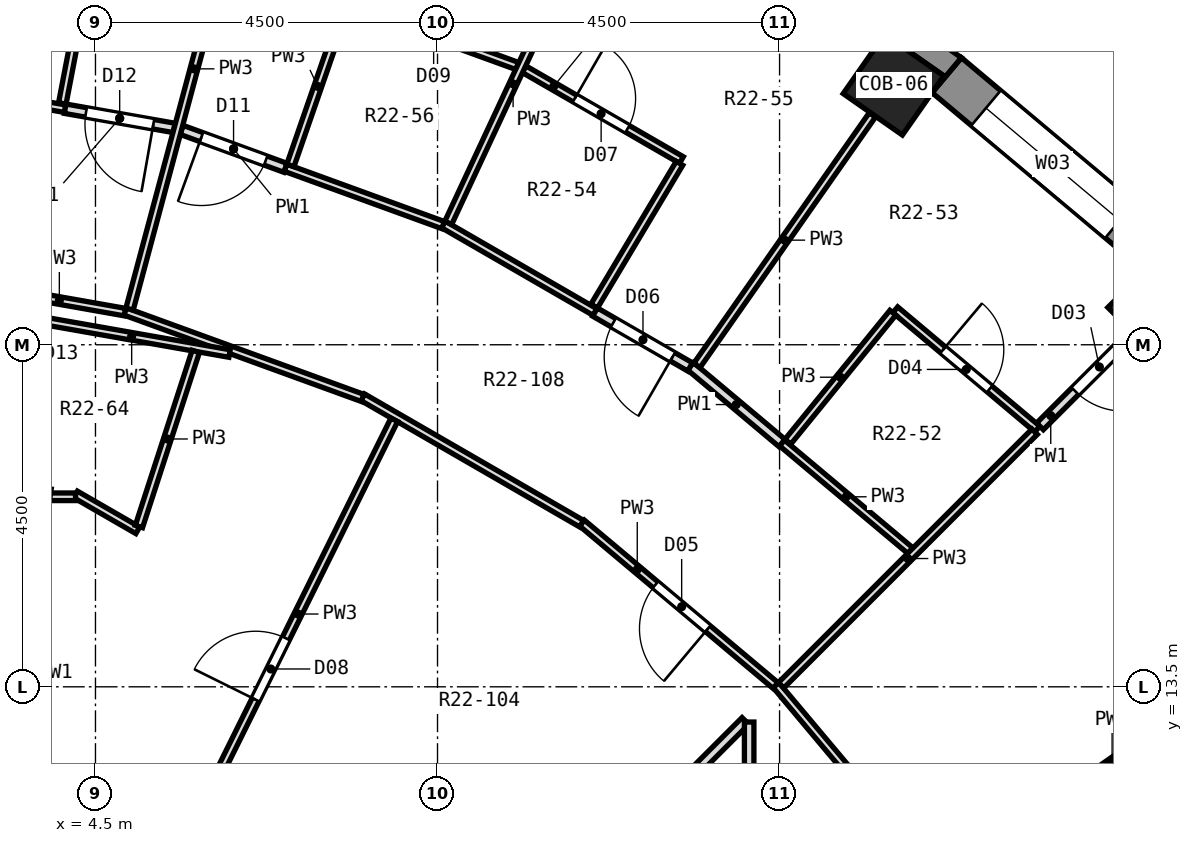
"""IFC4 building model, lengths in metres.
Left out: names, types, materials, properties, quantities, classifications, styles, units other than length and angle.
Written with IfcOpenShell. Run it as: python <this file> out.ifc"""

import sys

from ifc_helpers import new_model, si_unit, direction, frame, frame_2d, origin, origin_2d, place, context, subcontext, project, spatial, polyline, rectangle, outline, extrude, element, fill, save


model = new_model("IFC4")
c1 = context("Model", 3, precision=1e-05, world=origin(), true_north=direction((0.0, 1.0)))
c2 = subcontext(c1, "Body", "Model", "MODEL_VIEW")
j1 = project(units=[si_unit("LENGTHUNIT", "METRE"), si_unit("PLANEANGLEUNIT", "RADIAN")], contexts=[c1])
p1 = place(None, origin())
s1 = spatial("IfcSite", under=j1, at=p1, CompositionType="ELEMENT")
p2 = place(p1, origin())
s2 = spatial("IfcBuilding", under=s1, at=p2, CompositionType="ELEMENT")
p3 = place(p2, frame((0.0, 0.0, 141.4)))
s3 = spatial("IfcBuildingStorey", under=s2, at=p3, CompositionType="ELEMENT", Elevation=141.4)
for number, where, z_axis, x_axis in (
    (1, (18.491, 18.491, 0.0), (0.0, 0.0, 1.0), (0.707, 0.707, 0.0)),
    (2, (14.999, 21.421, 0.0), (0.0, 0.0, 1.0), (0.574, 0.819, 0.0)),
):
    element("IfcColumn", number, at=place(p3, frame(where, z_axis=z_axis, x_axis=x_axis)), inside=s3, PredefinedType="COLUMN", context=c2, shape_type="SweptSolid", body=[
        extrude(rectangle(XDim=0.95, YDim=0.95, at=origin_2d()), origin(), (0.0, 0.0, 1.0), 3.3),
    ])
p4 = place(p3, frame((18.494, 19.202, 0.0), z_axis=(0.0, 0.0, 1.0), x_axis=(-0.766055462616, 0.642774476932, 0.0)))
e3 = element("IfcWall", 3, at=p4, inside=s3, PredefinedType="SOLIDWALL", context=c2, shape_type="SweptSolid", body=[
    extrude(rectangle(XDim=3.648, YDim=0.6, at=frame_2d((1.824, 0.0))), origin(), (0.0, 0.0, 1.0), 2.8),
])
p5 = place(p4, frame((0.674, 0.0, 0.9)))
e4 = element("IfcOpeningElement", 4, at=p5, cuts=e3, PredefinedType="OPENING", context=c2, shape_type="SweptSolid", body=[
    extrude(rectangle(XDim=2.3, YDim=1.8, at=frame_2d((1.15, 0.9))), frame((0.0, 0.312, 0.0), z_axis=(0.0, -1.0, 0.0), x_axis=(1.0, 0.0, 0.0)), (0.0, 0.0, 1.0), 0.624),
])
p6 = place(p3, origin())
e5 = element("IfcWall", 5, at=p6, inside=s3, PredefinedType="SOLIDWALL", context=c2, shape_type="SweptSolid", body=[
    extrude(outline(polyline([(15.028, 22.382), (14.728, 21.862), (14.882, 22.083), (15.661, 21.538), (15.506, 21.317), (15.892, 21.777), (15.028, 22.382)])), origin(), (0.0, 0.0, 1.0), 2.8),
])
p7 = place(p3, frame((13.452, 13.524, 0.0), z_axis=(0.0, 0.0, 1.0), x_axis=(0.642888943472, -0.765959402554, 0.0)))
e6 = element("IfcWall", 6, at=p7, inside=s3, PredefinedType="PARTITIONING", context=c2, shape_type="SweptSolid", body=[
    extrude(rectangle(XDim=3.325, YDim=0.1, at=frame_2d((1.662, 0.0))), origin(), (0.0, 0.0, 1.0), 2.8),
])
p8 = place(p3, frame((10.9, 15.655, 0.0), z_axis=(0.0, 0.0, 1.0), x_axis=(0.765959402554, -0.642888943472, 0.0)))
e7 = element("IfcWall", 7, at=p8, inside=s3, PredefinedType="PARTITIONING", context=c2, shape_type="SweptSolid", body=[
    extrude(rectangle(XDim=3.325, YDim=0.1, at=frame_2d((1.662, 0.0))), origin(), (0.0, 0.0, 1.0), 2.8),
])
p9 = place(p8, frame((1.263, 0.0, 0.0)))
e8 = element("IfcOpeningElement", 8, at=p9, cuts=e7, PredefinedType="OPENING", context=c2, shape_type="SweptSolid", body=[
    extrude(rectangle(XDim=0.9, YDim=2.1, at=frame_2d((0.45, 1.05))), frame((0.0, 0.062, 0.0), z_axis=(0.0, -1.0, 0.0), x_axis=(1.0, 0.0, 0.0)), (0.0, 0.0, 1.0), 0.124),
])
p10 = place(p3, frame((13.532, 16.708, 0.0), z_axis=(0.0, 0.0, 1.0), x_axis=(0.766038513467, -0.642794676305, 0.0)))
e9 = element("IfcWall", 9, at=p10, inside=s3, PredefinedType="PARTITIONING", context=c2, shape_type="SweptSolid", body=[
    extrude(rectangle(XDim=2.205, YDim=0.1, at=frame_2d((1.103, 0.0))), origin(), (0.0, 0.0, 1.0), 2.8),
])
p11 = place(p3, frame((12.328, 17.718, 0.0), z_axis=(0.0, 0.0, 1.0), x_axis=(0.76611500949, -0.642703502585, 0.0)))
e10 = element("IfcWall", 10, at=p11, inside=s3, PredefinedType="PARTITIONING", context=c2, shape_type="SweptSolid", body=[
    extrude(rectangle(XDim=1.571, YDim=0.125, at=frame_2d((0.785, 0.0))), origin(), (0.0, 0.0, 1.0), 2.8),
])
p12 = place(p3, frame((15.022, 18.46, 0.0), z_axis=(0.0, 0.0, 1.0), x_axis=(0.765953139847, -0.642896404997, 0.0)))
e11 = element("IfcWall", 11, at=p12, inside=s3, PredefinedType="PARTITIONING", context=c2, shape_type="SweptSolid", body=[
    extrude(rectangle(XDim=2.44, YDim=0.1, at=frame_2d((1.22, 0.0))), origin(), (0.0, 0.0, 1.0), 2.8),
])
p13 = place(p12, frame((0.82, 0.0, 0.0)))
e12 = element("IfcOpeningElement", 12, at=p13, cuts=e11, PredefinedType="OPENING", context=c2, shape_type="SweptSolid", body=[
    extrude(rectangle(XDim=0.8, YDim=2.1, at=frame_2d((0.4, 1.05))), frame((0.0, 0.062, 0.0), z_axis=(0.0, -1.0, 0.0), x_axis=(1.0, 0.0, 0.0)), (0.0, 0.0, 1.0), 0.124),
])
p14 = place(p3, frame((4.238, 16.031, 0.0), z_axis=(0.0, 0.0, 1.0), x_axis=(0.866215708717, -0.499670237228, 0.0)))
e13 = element("IfcWall", 13, at=p14, inside=s3, PredefinedType="PARTITIONING", context=c2, shape_type="SweptSolid", body=[
    extrude(rectangle(XDim=0.945, YDim=0.1, at=frame_2d((0.472, 0.0))), origin(), (0.0, 0.0, 1.0), 2.8),
])
p15 = place(p3, frame((8.016, 17.309, 0.0), z_axis=(0.0, 0.0, 1.0), x_axis=(0.865920199123, -0.500182175564, 0.0)))
e14 = element("IfcWall", 14, at=p15, inside=s3, PredefinedType="PARTITIONING", context=c2, shape_type="SweptSolid", body=[
    extrude(rectangle(XDim=3.325, YDim=0.1, at=frame_2d((1.663, 0.0))), origin(), (0.0, 0.0, 1.0), 2.8),
])
p16 = place(p3, frame((9.076, 19.583, 0.0), z_axis=(0.0, 0.0, 1.0), x_axis=(0.865841628869, -0.500318172484, 0.0)))
e15 = element("IfcWall", 15, at=p16, inside=s3, PredefinedType="PARTITIONING", context=c2, shape_type="SweptSolid", body=[
    extrude(rectangle(XDim=2.306, YDim=0.1, at=frame_2d((1.153, 0.0))), origin(), (0.0, 0.0, 1.0), 2.8),
])
p17 = place(p3, frame((11.072, 18.43, 0.0), z_axis=(0.0, 0.0, 1.0), x_axis=(0.866112382925, -0.499849317439, 0.0)))
e16 = element("IfcWall", 16, at=p17, inside=s3, PredefinedType="PARTITIONING", context=c2, shape_type="SweptSolid", body=[
    extrude(rectangle(XDim=1.444, YDim=0.125, at=frame_2d((0.722, 0.0))), origin(), (0.0, 0.0, 1.0), 2.8),
])
p18 = place(p17, frame((0.278, 0.0, 0.0)))
e17 = element("IfcOpeningElement", 17, at=p18, cuts=e16, PredefinedType="OPENING", context=c2, shape_type="SweptSolid", body=[
    extrude(rectangle(XDim=0.9, YDim=2.1, at=frame_2d((0.45, 1.05))), frame((0.0, 0.074, 0.0), z_axis=(0.0, -1.0, 0.0), x_axis=(1.0, 0.0, 0.0)), (0.0, 0.0, 1.0), 0.149),
])
p19 = place(p3, frame((10.139, 21.625, 0.0), z_axis=(0.0, 0.0, 1.0), x_axis=(0.865989934965, -0.500061428766, 0.0)))
e18 = element("IfcWall", 18, at=p19, inside=s3, PredefinedType="PARTITIONING", context=c2, shape_type="SweptSolid", body=[
    extrude(rectangle(XDim=2.39, YDim=0.1, at=frame_2d((1.195, 0.0))), origin(), (0.0, 0.0, 1.0), 2.8),
])
p20 = place(p19, frame((0.77, 0.0, 0.0)))
e19 = element("IfcOpeningElement", 19, at=p20, cuts=e18, PredefinedType="OPENING", context=c2, shape_type="SweptSolid", body=[
    extrude(rectangle(XDim=0.8, YDim=2.1, at=frame_2d((0.4, 1.05))), frame((0.0, 0.062, 0.0), z_axis=(0.0, -1.0, 0.0), x_axis=(1.0, 0.0, 0.0)), (0.0, 0.0, 1.0), 0.124),
])
p21 = place(p3, frame((5.633, 20.827, 0.0), z_axis=(0.0, 0.0, 1.0), x_axis=(0.939292989356, -0.343116132159, 0.0)))
e20 = element("IfcWall", 20, at=p21, inside=s3, PredefinedType="PARTITIONING", context=c2, shape_type="SweptSolid", body=[
    extrude(rectangle(XDim=1.456, YDim=0.125, at=frame_2d((0.728, 0.0))), origin(), (0.0, 0.0, 1.0), 2.8),
])
p22 = place(p21, frame((0.278, 0.0, 0.0)))
e21 = element("IfcOpeningElement", 21, at=p22, cuts=e20, PredefinedType="OPENING", context=c2, shape_type="SweptSolid", body=[
    extrude(rectangle(XDim=0.9, YDim=2.1, at=frame_2d((0.45, 1.05))), frame((0.0, 0.074, 0.0), z_axis=(0.0, -1.0, 0.0), x_axis=(1.0, 0.0, 0.0)), (0.0, 0.0, 1.0), 0.149),
])
p23 = place(p3, frame((4.888, 18.438, 0.0), z_axis=(0.0, 0.0, 1.0), x_axis=(0.939679760884, -0.342055473549, 0.0)))
e22 = element("IfcWall", 22, at=p23, inside=s3, PredefinedType="PARTITIONING", context=c2, shape_type="SweptSolid", body=[
    extrude(rectangle(XDim=3.325, YDim=0.1, at=frame_2d((1.663, 0.0))), origin(), (0.0, 0.0, 1.0), 2.8),
])
p24 = place(p3, frame((7.001, 20.329, 0.0), z_axis=(0.0, 0.0, 1.0), x_axis=(0.939728749343, -0.341920864613, 0.0)))
e23 = element("IfcWall", 23, at=p24, inside=s3, PredefinedType="PARTITIONING", context=c2, shape_type="SweptSolid", body=[
    extrude(rectangle(XDim=2.205, YDim=0.1, at=frame_2d((1.103, 0.0))), origin(), (0.0, 0.0, 1.0), 2.8),
])
p25 = place(p3, frame((7.802, 22.485, 0.0), z_axis=(0.0, 0.0, 1.0), x_axis=(0.939659214987, -0.342111911063, 0.0)))
e24 = element("IfcWall", 24, at=p25, inside=s3, PredefinedType="PARTITIONING", context=c2, shape_type="SweptSolid", body=[
    extrude(rectangle(XDim=2.391, YDim=0.1, at=frame_2d((1.196, 0.0))), origin(), (0.0, 0.0, 1.0), 2.8),
])
p26 = place(p25, frame((0.821, 0.0, 0.0)))
e25 = element("IfcOpeningElement", 25, at=p26, cuts=e24, PredefinedType="OPENING", context=c2, shape_type="SweptSolid", body=[
    extrude(rectangle(XDim=0.8, YDim=2.1, at=frame_2d((0.4, 1.05))), frame((0.0, 0.062, 0.0), z_axis=(0.0, -1.0, 0.0), x_axis=(1.0, 0.0, 0.0)), (0.0, 0.0, 1.0), 0.124),
])
p27 = place(p3, frame((3.688, 18.338, 0.0), z_axis=(0.0, 0.0, 1.0), x_axis=(0.984859586639, -0.173353957572, 0.0)))
e26 = element("IfcWall", 26, at=p27, inside=s3, PredefinedType="PARTITIONING", context=c2, shape_type="SweptSolid", body=[
    extrude(rectangle(XDim=2.615, YDim=0.1, at=frame_2d((1.308, 0.0))), origin(), (0.0, 0.0, 1.0), 2.8),
])
p28 = place(p3, frame((1.612, 19.008, 0.0), z_axis=(0.0, 0.0, 1.0), x_axis=(0.984770991222, -0.173856535243, 0.0)))
e27 = element("IfcWall", 27, at=p28, inside=s3, PredefinedType="PARTITIONING", context=c2, shape_type="SweptSolid", body=[
    extrude(rectangle(XDim=3.325, YDim=0.1, at=frame_2d((1.663, 0.0))), origin(), (0.0, 0.0, 1.0), 2.8),
])
p29 = place(p28, frame((1.163, 0.0, 0.0)))
e28 = element("IfcOpeningElement", 28, at=p29, cuts=e27, PredefinedType="OPENING", context=c2, shape_type="SweptSolid", body=[
    extrude(rectangle(XDim=0.9, YDim=2.1, at=frame_2d((0.45, 1.05))), frame((0.0, 0.062, 0.0), z_axis=(0.0, -1.0, 0.0), x_axis=(1.0, 0.0, 0.0)), (0.0, 0.0, 1.0), 0.124),
])
p30 = place(p3, frame((1.831, 21.506, 0.0), z_axis=(0.0, 0.0, 1.0), x_axis=(0.984783558818, -0.173785333909, 0.0)))
e29 = element("IfcWall", 29, at=p30, inside=s3, PredefinedType="PARTITIONING", context=c2, shape_type="SweptSolid", body=[
    extrude(rectangle(XDim=2.305, YDim=0.1, at=frame_2d((1.153, 0.0))), origin(), (0.0, 0.0, 1.0), 2.8),
])
p31 = place(p3, frame((4.101, 21.105, 0.0), z_axis=(0.0, 0.0, 1.0), x_axis=(0.984862774054, -0.173335848233, 0.0)))
e30 = element("IfcWall", 30, at=p31, inside=s3, PredefinedType="PARTITIONING", context=c2, shape_type="SweptSolid", body=[
    extrude(rectangle(XDim=1.456, YDim=0.125, at=frame_2d((0.728, 0.0))), origin(), (0.0, 0.0, 1.0), 2.8),
])
p32 = place(p31, frame((0.278, 0.0, 0.0)))
e31 = element("IfcOpeningElement", 31, at=p32, cuts=e30, PredefinedType="OPENING", context=c2, shape_type="SweptSolid", body=[
    extrude(rectangle(XDim=0.9, YDim=2.1, at=frame_2d((0.45, 1.05))), frame((0.0, 0.074, 0.0), z_axis=(0.0, -1.0, 0.0), x_axis=(1.0, 0.0, 0.0)), (0.0, 0.0, 1.0), 0.149),
])
p33 = place(p3, frame((3.899, 16.0, 0.0), z_axis=(0.0, 0.0, 1.0), x_axis=(1.0, 0.0, 0.0)))
e32 = element("IfcWall", 32, at=p33, inside=s3, PredefinedType="PARTITIONING", context=c2, shape_type="SweptSolid", body=[
    extrude(rectangle(XDim=0.339, YDim=0.1, at=frame_2d((0.169, 0.0))), origin(), (0.0, 0.0, 1.0), 2.8),
])
p34 = place(p3, frame((15.663, 10.968, 0.0), z_axis=(0.0, 0.0, 1.0), x_axis=(0.8192371786, 0.573454832746, 0.0)))
e33 = element("IfcWall", 33, at=p34, inside=s3, PredefinedType="PARTITIONING", context=c2, shape_type="SweptSolid", body=[
    extrude(rectangle(XDim=6.544, YDim=0.1, at=frame_2d((3.272, 0.0))), origin(), (0.0, 0.0, 1.0), 2.8),
])
p35 = place(p34, frame((3.165, 0.0, 0.0)))
e34 = element("IfcOpeningElement", 34, at=p35, cuts=e33, PredefinedType="OPENING", context=c2, shape_type="SweptSolid", body=[
    extrude(rectangle(XDim=0.9, YDim=2.1, at=frame_2d((0.45, 1.05))), frame((0.0, 0.062, 0.0), z_axis=(0.0, -1.0, 0.0), x_axis=(1.0, 0.0, 0.0)), (0.0, 0.0, 1.0), 0.124),
])
p36 = place(p3, frame((13.52, 13.52, 0.0), z_axis=(0.0, 0.0, 1.0), x_axis=(0.707106781187, 0.707106781187, 0.0)))
e35 = element("IfcWall", 35, at=p36, inside=s3, PredefinedType="PARTITIONING", context=c2, shape_type="SweptSolid", body=[
    extrude(rectangle(XDim=4.717, YDim=0.1, at=frame_2d((2.358, 0.0))), origin(), (0.0, 0.0, 1.0), 2.8),
])
p37 = place(p3, frame((8.278, 8.278, 0.0), z_axis=(0.0, 0.0, 1.0), x_axis=(0.707106781187, 0.707106781187, 0.0)))
e36 = element("IfcWall", 36, at=p37, inside=s3, PredefinedType="PARTITIONING", context=c2, shape_type="SweptSolid", body=[
    extrude(rectangle(XDim=6.75, YDim=0.125, at=frame_2d((3.375, 0.0))), origin(), (0.0, 0.0, 1.0), 2.8),
])
p38 = place(p3, frame((16.926, 16.926, 0.0), z_axis=(0.0, 0.0, 1.0), x_axis=(0.707106781187, 0.707106781187, 0.0)))
e37 = element("IfcWall", 37, at=p38, inside=s3, PredefinedType="PARTITIONING", context=c2, shape_type="SweptSolid", body=[
    extrude(rectangle(XDim=1.728, YDim=0.125, at=frame_2d((0.864, 0.0))), origin(), (0.0, 0.0, 1.0), 2.8),
])
p39 = place(p38, frame((0.655, 0.0, 0.0)))
e38 = element("IfcOpeningElement", 38, at=p39, cuts=e37, PredefinedType="OPENING", context=c2, shape_type="SweptSolid", body=[
    extrude(rectangle(XDim=0.9, YDim=2.1, at=frame_2d((0.45, 1.05))), frame((0.0, 0.074, 0.0), z_axis=(0.0, -1.0, 0.0), x_axis=(1.0, 0.0, 0.0)), (0.0, 0.0, 1.0), 0.149),
])
p40 = place(p3, frame((13.609, 16.724, 0.0), z_axis=(0.0, 0.0, 1.0), x_axis=(0.631272959342, 0.77556073315, 0.0)))
e39 = element("IfcWall", 39, at=p40, inside=s3, PredefinedType="PARTITIONING", context=c2, shape_type="SweptSolid", body=[
    extrude(rectangle(XDim=2.188, YDim=0.1, at=frame_2d((1.094, 0.0))), origin(), (0.0, 0.0, 1.0), 2.8),
])
p41 = place(p3, frame((12.413, 17.728, 0.0), z_axis=(0.0, 0.0, 1.0), x_axis=(0.573641530368, 0.819106461113, 0.0)))
e40 = element("IfcWall", 40, at=p41, inside=s3, PredefinedType="PARTITIONING", context=c2, shape_type="SweptSolid", body=[
    extrude(rectangle(XDim=4.023, YDim=0.1, at=frame_2d((2.012, 0.0))), origin(), (0.0, 0.0, 1.0), 2.8),
])
p42 = place(p3, frame((11.061, 18.509, 0.0), z_axis=(0.0, 0.0, 1.0), x_axis=(0.512903306279, 0.85844638645, 0.0)))
e41 = element("IfcWall", 41, at=p42, inside=s3, PredefinedType="PARTITIONING", context=c2, shape_type="SweptSolid", body=[
    extrude(rectangle(XDim=2.188, YDim=0.1, at=frame_2d((1.094, 0.0))), origin(), (0.0, 0.0, 1.0), 2.8),
])
p43 = place(p3, frame((5.189, 10.47, 0.0), z_axis=(0.0, 0.0, 1.0), x_axis=(0.444040739055, 0.896006597107, 0.0)))
e42 = element("IfcWall", 42, at=p43, inside=s3, PredefinedType="PARTITIONING", context=c2, shape_type="SweptSolid", body=[
    extrude(rectangle(XDim=7.301, YDim=0.1, at=frame_2d((3.65, 0.0))), origin(), (0.0, 0.0, 1.0), 2.8),
])
p44 = place(p43, frame((3.193, 0.0, 0.0)))
e43 = element("IfcOpeningElement", 43, at=p44, cuts=e42, PredefinedType="OPENING", context=c2, shape_type="SweptSolid", body=[
    extrude(rectangle(XDim=0.9, YDim=2.1, at=frame_2d((0.45, 1.05))), frame((0.0, 0.062, 0.0), z_axis=(0.0, -1.0, 0.0), x_axis=(1.0, 0.0, 0.0)), (0.0, 0.0, 1.0), 0.124),
])
p45 = place(p3, frame((9.141, 19.603, 0.0), z_axis=(0.0, 0.0, 1.0), x_axis=(0.42279934512, 0.906223324444, 0.0)))
e44 = element("IfcWall", 44, at=p45, inside=s3, PredefinedType="PARTITIONING", context=c2, shape_type="SweptSolid", body=[
    extrude(rectangle(XDim=4.035, YDim=0.1, at=frame_2d((2.018, 0.0))), origin(), (0.0, 0.0, 1.0), 2.8),
])
p46 = place(p3, frame((7.064, 20.359, 0.0), z_axis=(0.0, 0.0, 1.0), x_axis=(0.327788872324, 0.944751001683, 0.0)))
e45 = element("IfcWall", 45, at=p46, inside=s3, PredefinedType="PARTITIONING", context=c2, shape_type="SweptSolid", body=[
    extrude(rectangle(XDim=2.2, YDim=0.1, at=frame_2d((1.1, 0.0))), origin(), (0.0, 0.0, 1.0), 2.8),
])
p47 = place(p3, frame((5.072, 15.609, 0.0), z_axis=(0.0, 0.0, 1.0), x_axis=(0.30874872516, 0.95114364042, 0.0)))
e46 = element("IfcWall", 46, at=p47, inside=s3, PredefinedType="PARTITIONING", context=c2, shape_type="SweptSolid", body=[
    extrude(rectangle(XDim=2.422, YDim=0.1, at=frame_2d((1.211, 0.0))), origin(), (0.0, 0.0, 1.0), 2.8),
])
p48 = place(p3, frame((4.949, 18.469, 0.0), z_axis=(0.0, 0.0, 1.0), x_axis=(0.258793270627, 0.96593273217, 0.0)))
e47 = element("IfcWall", 47, at=p48, inside=s3, PredefinedType="PARTITIONING", context=c2, shape_type="SweptSolid", body=[
    extrude(rectangle(XDim=6.544, YDim=0.1, at=frame_2d((3.272, 0.0))), origin(), (0.0, 0.0, 1.0), 2.8),
])
p49 = place(p3, frame((4.064, 21.175, 0.0), z_axis=(0.0, 0.0, 1.0), x_axis=(0.188685986474, 0.982037473067, 0.0)))
e48 = element("IfcWall", 48, at=p49, inside=s3, PredefinedType="PARTITIONING", context=c2, shape_type="SweptSolid", body=[
    extrude(rectangle(XDim=2.188, YDim=0.1, at=frame_2d((1.094, 0.0))), origin(), (0.0, 0.0, 1.0), 2.8),
])
p50 = place(p3, frame((13.1, 9.398, 0.0), z_axis=(0.0, 0.0, 1.0), x_axis=(0.0, 1.0, 0.0)))
e49 = element("IfcWall", 49, at=p50, inside=s3, PredefinedType="PARTITIONING", context=c2, shape_type="SweptSolid", body=[
    extrude(rectangle(XDim=3.639, YDim=0.125, at=frame_2d((1.819, 0.0))), origin(), (0.0, 0.0, 1.0), 2.8),
])
p51 = place(p5, origin())
e50 = element("IfcWindow", 50, at=p51, inside=s3, PartitioningType="SINGLE_PANEL", PredefinedType="WINDOW", context=c2, shape_type="SweptSolid", body=[
    extrude(rectangle(XDim=2.3, YDim=1.8, at=frame_2d((1.15, 0.9))), frame((0.0, 0.18, 0.0), z_axis=(0.0, -1.0, 0.0), x_axis=(1.0, 0.0, 0.0)), (0.0, 0.0, 1.0), 0.06),
])
fill(e4, e50)
p52 = place(p39, frame((0.9, 0.0, 0.0), z_axis=(0.0, 0.0, 1.0), x_axis=(-1.0, 0.0, 0.0)))
e51 = element("IfcDoor", 51, at=p52, inside=s3, OperationType="SINGLE_SWING_LEFT", PredefinedType="DOOR", context=c2, shape_type="SweptSolid", body=[
    extrude(rectangle(XDim=0.9, YDim=2.1, at=frame_2d((0.45, 1.05))), frame((0.0, 0.025, 0.0), z_axis=(0.0, -1.0, 0.0), x_axis=(1.0, 0.0, 0.0)), (0.0, 0.0, 1.0), 0.05),
])
fill(e38, e51)
p53 = place(p13, origin())
e52 = element("IfcDoor", 52, at=p53, inside=s3, OperationType="SINGLE_SWING_LEFT", PredefinedType="DOOR", context=c2, shape_type="SweptSolid", body=[
    extrude(rectangle(XDim=0.8, YDim=2.1, at=frame_2d((0.4, 1.05))), frame((0.0, 0.025, 0.0), z_axis=(0.0, -1.0, 0.0), x_axis=(1.0, 0.0, 0.0)), (0.0, 0.0, 1.0), 0.05),
])
fill(e12, e52)
p54 = place(p9, frame((0.9, 0.0, 0.0), z_axis=(0.0, 0.0, 1.0), x_axis=(-1.0, 0.0, 0.0)))
e53 = element("IfcDoor", 53, at=p54, inside=s3, OperationType="SINGLE_SWING_LEFT", PredefinedType="DOOR", context=c2, shape_type="SweptSolid", body=[
    extrude(rectangle(XDim=0.9, YDim=2.1, at=frame_2d((0.45, 1.05))), frame((0.0, 0.025, 0.0), z_axis=(0.0, -1.0, 0.0), x_axis=(1.0, 0.0, 0.0)), (0.0, 0.0, 1.0), 0.05),
])
fill(e8, e53)
p55 = place(p18, frame((0.9, 0.0, 0.0), z_axis=(0.0, 0.0, 1.0), x_axis=(-1.0, 0.0, 0.0)))
e54 = element("IfcDoor", 54, at=p55, inside=s3, OperationType="SINGLE_SWING_LEFT", PredefinedType="DOOR", context=c2, shape_type="SweptSolid", body=[
    extrude(rectangle(XDim=0.9, YDim=2.1, at=frame_2d((0.45, 1.05))), frame((0.0, 0.025, 0.0), z_axis=(0.0, -1.0, 0.0), x_axis=(1.0, 0.0, 0.0)), (0.0, 0.0, 1.0), 0.05),
])
fill(e17, e54)
p56 = place(p20, origin())
e55 = element("IfcDoor", 55, at=p56, inside=s3, OperationType="SINGLE_SWING_LEFT", PredefinedType="DOOR", context=c2, shape_type="SweptSolid", body=[
    extrude(rectangle(XDim=0.8, YDim=2.1, at=frame_2d((0.4, 1.05))), frame((0.0, 0.025, 0.0), z_axis=(0.0, -1.0, 0.0), x_axis=(1.0, 0.0, 0.0)), (0.0, 0.0, 1.0), 0.05),
])
fill(e19, e55)
p57 = place(p44, origin())
e56 = element("IfcDoor", 56, at=p57, inside=s3, OperationType="SINGLE_SWING_LEFT", PredefinedType="DOOR", context=c2, shape_type="SweptSolid", body=[
    extrude(rectangle(XDim=0.9, YDim=2.1, at=frame_2d((0.45, 1.05))), frame((0.0, 0.025, 0.0), z_axis=(0.0, -1.0, 0.0), x_axis=(1.0, 0.0, 0.0)), (0.0, 0.0, 1.0), 0.05),
])
fill(e43, e56)
p58 = place(p22, frame((0.9, 0.0, 0.0), z_axis=(0.0, 0.0, 1.0), x_axis=(-1.0, 0.0, 0.0)))
e57 = element("IfcDoor", 57, at=p58, inside=s3, OperationType="SINGLE_SWING_RIGHT", PredefinedType="DOOR", context=c2, shape_type="SweptSolid", body=[
    extrude(rectangle(XDim=0.9, YDim=2.1, at=frame_2d((0.45, 1.05))), frame((0.0, 0.025, 0.0), z_axis=(0.0, -1.0, 0.0), x_axis=(1.0, 0.0, 0.0)), (0.0, 0.0, 1.0), 0.05),
])
fill(e21, e57)
p59 = place(p32, frame((0.9, 0.0, 0.0), z_axis=(0.0, 0.0, 1.0), x_axis=(-1.0, 0.0, 0.0)))
e58 = element("IfcDoor", 58, at=p59, inside=s3, OperationType="SINGLE_SWING_LEFT", PredefinedType="DOOR", context=c2, shape_type="SweptSolid", body=[
    extrude(rectangle(XDim=0.9, YDim=2.1, at=frame_2d((0.45, 1.05))), frame((0.0, 0.025, 0.0), z_axis=(0.0, -1.0, 0.0), x_axis=(1.0, 0.0, 0.0)), (0.0, 0.0, 1.0), 0.05),
])
fill(e31, e58)
save(model, sys.argv[1])
